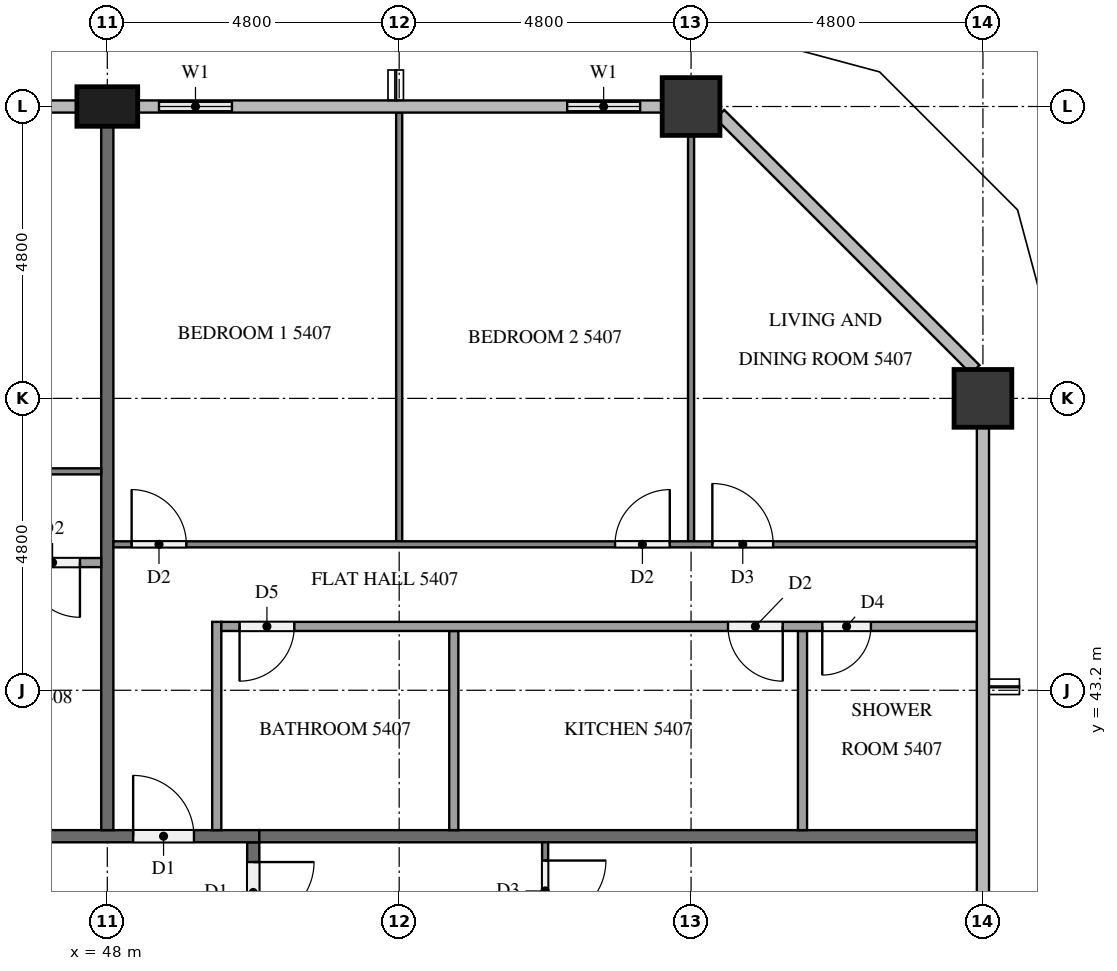
"""IFC4 building model, lengths in metres.
Left out: names, types, materials, properties, quantities, classifications, styles, units other than length and angle.
Written with IfcOpenShell. Run it as: python <this file> out.ifc"""

import sys

from ifc_helpers import new_model, si_unit, direction, frame, frame_2d, origin, origin_2d, place, context, subcontext, project, spatial, rectangle, extrude, element, fill, save


model = new_model("IFC4")
c1 = context("Model", 3, precision=1e-05, world=origin(), true_north=direction((0.0, 1.0)))
c2 = subcontext(c1, "Body", "Model", "MODEL_VIEW")
j1 = project(units=[si_unit("LENGTHUNIT", "METRE"), si_unit("PLANEANGLEUNIT", "RADIAN")], contexts=[c1])
p1 = place(None, origin())
s1 = spatial("IfcSite", under=j1, at=p1, CompositionType="ELEMENT")
p2 = place(p1, origin())
s2 = spatial("IfcBuilding", under=s1, at=p2, CompositionType="ELEMENT")
p3 = place(p2, frame((0.0, 0.0, 208.8)))
s3 = spatial("IfcBuildingStorey", under=s2, at=p3, CompositionType="ELEMENT", Elevation=208.8)
for number, where, z_axis, x_axis in (
    (1, (62.4, 48.0, 0.0), (0.0, 0.0, 1.0), (1.0, 0.0, 0.0)),
    (2, (57.6, 52.8, 0.0), (0.0, 0.0, 1.0), (1.0, 0.0, 0.0)),
):
    element("IfcColumn", number, at=place(p3, frame(where, z_axis=z_axis, x_axis=x_axis)), inside=s3, PredefinedType="COLUMN", context=c2, shape_type="SweptSolid", body=[
        extrude(rectangle(XDim=0.95, YDim=0.95, at=origin_2d()), origin(), (0.0, 0.0, 1.0), 3.2),
    ])
p4 = place(p3, frame((48.0, 52.8, 0.0), z_axis=(0.0, 0.0, 1.0), x_axis=(1.0, 0.0, 0.0)))
e3 = element("IfcColumn", 3, at=p4, inside=s3, PredefinedType="COLUMN", context=c2, shape_type="SweptSolid", body=[
    extrude(rectangle(XDim=1.0, YDim=0.65, at=origin_2d()), origin(), (0.0, 0.0, 1.0), 3.2),
])
p5 = place(p3, frame((57.125, 52.8, 0.0), z_axis=(0.0, 0.0, 1.0), x_axis=(-1.0, 0.0, 0.0)))
e4 = element("IfcWall", 4, at=p5, inside=s3, PredefinedType="SOLIDWALL", context=c2, shape_type="SweptSolid", body=[
    extrude(rectangle(XDim=1.925, YDim=0.15, at=frame_2d((0.962, 0.0))), origin(), (0.0, 0.0, 1.0), 3.2),
])
p6 = place(p5, frame((0.363, 0.0, 0.9)))
e5 = element("IfcOpeningElement", 5, at=p6, cuts=e4, PredefinedType="OPENING", context=c2, shape_type="SweptSolid", body=[
    extrude(rectangle(XDim=1.2, YDim=1.4, at=frame_2d((0.6, 0.7))), frame((0.0, 0.085, 0.0), z_axis=(0.0, -1.0, 0.0), x_axis=(1.0, 0.0, 0.0)), (0.0, 0.0, 1.0), 0.17),
])
p7 = place(p3, frame((50.4, 52.8, 0.0), z_axis=(0.0, 0.0, 1.0), x_axis=(-1.0, 0.0, 0.0)))
e6 = element("IfcWall", 6, at=p7, inside=s3, PredefinedType="SOLIDWALL", context=c2, shape_type="SweptSolid", body=[
    extrude(rectangle(XDim=1.9, YDim=0.15, at=frame_2d((0.95, 0.0))), origin(), (0.0, 0.0, 1.0), 3.2),
])
p8 = place(p7, frame((0.35, 0.0, 0.9)))
e7 = element("IfcOpeningElement", 7, at=p8, cuts=e6, PredefinedType="OPENING", context=c2, shape_type="SweptSolid", body=[
    extrude(rectangle(XDim=1.2, YDim=1.4, at=frame_2d((0.6, 0.7))), frame((0.0, 0.085, 0.0), z_axis=(0.0, -1.0, 0.0), x_axis=(1.0, 0.0, 0.0)), (0.0, 0.0, 1.0), 0.17),
])
p9 = place(p3, frame((50.4, 40.7, 0.0), z_axis=(0.0, 0.0, 1.0), x_axis=(0.0, -1.0, 0.0)))
e8 = element("IfcWall", 8, at=p9, inside=s3, PredefinedType="PARTITIONING", context=c2, shape_type="SweptSolid", body=[
    extrude(rectangle(XDim=28.6, YDim=0.2, at=frame_2d((14.3, 0.0))), origin(), (0.0, 0.0, 1.0), 3.2),
])
p10 = place(p9, frame((19.525, 0.0, 0.0)))
e9 = element("IfcOpeningElement", 9, at=p10, cuts=e8, PredefinedType="OPENING", context=c2, shape_type="SweptSolid", body=[
    extrude(rectangle(XDim=1.0, YDim=2.1, at=frame_2d((0.5, 1.05))), frame((0.0, 0.11, 0.0), z_axis=(0.0, -1.0, 0.0), x_axis=(1.0, 0.0, 0.0)), (0.0, 0.0, 1.0), 0.22),
])
p11 = place(p9, frame((7.525, 0.0, 0.0)))
e10 = element("IfcOpeningElement", 10, at=p11, cuts=e8, PredefinedType="OPENING", context=c2, shape_type="SweptSolid", body=[
    extrude(rectangle(XDim=1.0, YDim=2.1, at=frame_2d((0.5, 1.05))), frame((0.0, 0.11, 0.0), z_axis=(0.0, -1.0, 0.0), x_axis=(1.0, 0.0, 0.0)), (0.0, 0.0, 1.0), 0.22),
])
p12 = place(p9, frame((0.325, 0.0, 0.0)))
e11 = element("IfcOpeningElement", 11, at=p12, cuts=e8, PredefinedType="OPENING", context=c2, shape_type="SweptSolid", body=[
    extrude(rectangle(XDim=1.0, YDim=2.1, at=frame_2d((0.5, 1.05))), frame((0.0, 0.11, 0.0), z_axis=(0.0, -1.0, 0.0), x_axis=(1.0, 0.0, 0.0)), (0.0, 0.0, 1.0), 0.22),
])
p13 = place(p3, frame((11.9, 40.8, 0.0), z_axis=(0.0, 0.0, 1.0), x_axis=(1.0, 0.0, 0.0)))
e12 = element("IfcWall", 12, at=p13, inside=s3, PredefinedType="PARTITIONING", context=c2, shape_type="SweptSolid", body=[
    extrude(rectangle(XDim=38.6, YDim=0.2, at=frame_2d((19.3, 0.0))), origin(), (0.0, 0.0, 1.0), 3.2),
])
p14 = place(p13, frame((36.525, 0.0, 0.0)))
e13 = element("IfcOpeningElement", 13, at=p14, cuts=e12, PredefinedType="OPENING", context=c2, shape_type="SweptSolid", body=[
    extrude(rectangle(XDim=1.0, YDim=2.1, at=frame_2d((0.5, 1.05))), frame((0.0, 0.11, 0.0), z_axis=(0.0, -1.0, 0.0), x_axis=(1.0, 0.0, 0.0)), (0.0, 0.0, 1.0), 0.22),
])
p15 = place(p13, frame((29.325, 0.0, 0.0)))
e14 = element("IfcOpeningElement", 14, at=p15, cuts=e12, PredefinedType="OPENING", context=c2, shape_type="SweptSolid", body=[
    extrude(rectangle(XDim=1.0, YDim=2.1, at=frame_2d((0.5, 1.05))), frame((0.0, 0.11, 0.0), z_axis=(0.0, -1.0, 0.0), x_axis=(1.0, 0.0, 0.0)), (0.0, 0.0, 1.0), 0.22),
])
p16 = place(p13, frame((12.525, 0.0, 0.0)))
e15 = element("IfcOpeningElement", 15, at=p16, cuts=e12, PredefinedType="OPENING", context=c2, shape_type="SweptSolid", body=[
    extrude(rectangle(XDim=1.0, YDim=2.1, at=frame_2d((0.5, 1.05))), frame((0.0, 0.11, 0.0), z_axis=(0.0, -1.0, 0.0), x_axis=(1.0, 0.0, 0.0)), (0.0, 0.0, 1.0), 0.22),
])
p17 = place(p13, frame((10.625, 0.0, 0.0)))
e16 = element("IfcOpeningElement", 16, at=p17, cuts=e12, PredefinedType="OPENING", context=c2, shape_type="SweptSolid", body=[
    extrude(rectangle(XDim=1.1, YDim=2.1, at=frame_2d((0.55, 1.05))), frame((0.0, 0.11, 0.0), z_axis=(0.0, -1.0, 0.0), x_axis=(1.0, 0.0, 0.0)), (0.0, 0.0, 1.0), 0.22),
])
p18 = place(p3, frame((50.5, 40.8, 0.0), z_axis=(0.0, 0.0, 1.0), x_axis=(1.0, 0.0, 0.0)))
e17 = element("IfcWall", 17, at=p18, inside=s3, PredefinedType="PARTITIONING", context=c2, shape_type="SweptSolid", body=[
    extrude(rectangle(XDim=11.8, YDim=0.2, at=frame_2d((5.9, 0.0))), origin(), (0.0, 0.0, 1.0), 3.2),
])
p19 = place(p3, frame((48.0, 52.475, 0.0), z_axis=(0.0, 0.0, 1.0), x_axis=(0.0, -1.0, 0.0)))
e18 = element("IfcWall", 18, at=p19, inside=s3, PredefinedType="PARTITIONING", context=c2, shape_type="SweptSolid", body=[
    extrude(rectangle(XDim=11.575, YDim=0.2, at=frame_2d((5.788, 0.0))), origin(), (0.0, 0.0, 1.0), 3.2),
])
p20 = place(p3, frame((55.2, 40.7, 0.0), z_axis=(0.0, 0.0, 1.0), x_axis=(0.0, -1.0, 0.0)))
e19 = element("IfcWall", 19, at=p20, inside=s3, PredefinedType="PARTITIONING", context=c2, shape_type="SweptSolid", body=[
    extrude(rectangle(XDim=7.0, YDim=0.1, at=frame_2d((3.5, 0.0))), origin(), (0.0, 0.0, 1.0), 3.2),
])
p21 = place(p20, frame((0.3, 0.0, 0.0)))
e20 = element("IfcOpeningElement", 20, at=p21, cuts=e19, PredefinedType="OPENING", context=c2, shape_type="SweptSolid", body=[
    extrude(rectangle(XDim=1.0, YDim=2.1, at=frame_2d((0.5, 1.05))), frame((0.0, 0.06, 0.0), z_axis=(0.0, -1.0, 0.0), x_axis=(1.0, 0.0, 0.0)), (0.0, 0.0, 1.0), 0.12),
])
p22 = place(p3, frame((52.8, 45.65, 0.0), z_axis=(0.0, 0.0, 1.0), x_axis=(0.0, 1.0, 0.0)))
e21 = element("IfcWall", 21, at=p22, inside=s3, PredefinedType="PARTITIONING", context=c2, shape_type="SweptSolid", body=[
    extrude(rectangle(XDim=7.05, YDim=0.1, at=frame_2d((3.525, 0.0))), origin(), (0.0, 0.0, 1.0), 3.2),
])
p23 = place(p3, frame((57.6, 45.65, 0.0), z_axis=(0.0, 0.0, 1.0), x_axis=(0.0, 1.0, 0.0)))
e22 = element("IfcWall", 22, at=p23, inside=s3, PredefinedType="PARTITIONING", context=c2, shape_type="SweptSolid", body=[
    extrude(rectangle(XDim=6.675, YDim=0.1, at=frame_2d((3.337, 0.0))), origin(), (0.0, 0.0, 1.0), 3.2),
])
p24 = place(p3, frame((48.1, 45.6, 0.0), z_axis=(0.0, 0.0, 1.0), x_axis=(1.0, 0.0, 0.0)))
e23 = element("IfcWall", 23, at=p24, inside=s3, PredefinedType="PARTITIONING", context=c2, shape_type="SweptSolid", body=[
    extrude(rectangle(XDim=14.2, YDim=0.1, at=frame_2d((7.1, 0.0))), origin(), (0.0, 0.0, 1.0), 3.2),
])
p25 = place(p24, frame((0.3, 0.0, 0.0)))
e24 = element("IfcOpeningElement", 24, at=p25, cuts=e23, PredefinedType="OPENING", context=c2, shape_type="SweptSolid", body=[
    extrude(rectangle(XDim=0.9, YDim=2.1, at=frame_2d((0.45, 1.05))), frame((0.0, 0.06, 0.0), z_axis=(0.0, -1.0, 0.0), x_axis=(1.0, 0.0, 0.0)), (0.0, 0.0, 1.0), 0.12),
])
p26 = place(p24, frame((8.25, 0.0, 0.0)))
e25 = element("IfcOpeningElement", 25, at=p26, cuts=e23, PredefinedType="OPENING", context=c2, shape_type="SweptSolid", body=[
    extrude(rectangle(XDim=0.9, YDim=2.1, at=frame_2d((0.45, 1.05))), frame((0.0, 0.06, 0.0), z_axis=(0.0, -1.0, 0.0), x_axis=(1.0, 0.0, 0.0)), (0.0, 0.0, 1.0), 0.12),
])
p27 = place(p24, frame((9.85, 0.0, 0.0)))
e26 = element("IfcOpeningElement", 26, at=p27, cuts=e23, PredefinedType="OPENING", context=c2, shape_type="SweptSolid", body=[
    extrude(rectangle(XDim=1.0, YDim=2.1, at=frame_2d((0.5, 1.05))), frame((0.0, 0.06, 0.0), z_axis=(0.0, -1.0, 0.0), x_axis=(1.0, 0.0, 0.0)), (0.0, 0.0, 1.0), 0.12),
])
for number, where, z_axis, x_axis in (
    (27, (53.698, 40.9, 0.0), (0.0, 0.0, 1.0), (0.0, 1.0, 0.0)),
    (28, (59.433, 40.9, 0.0), (0.0, 0.0, 1.0), (0.0, 1.0, 0.0)),
):
    element("IfcWall", number, at=place(p3, frame(where, z_axis=z_axis, x_axis=x_axis)), inside=s3, PredefinedType="PARTITIONING", context=c2, shape_type="SweptSolid", body=[
        extrude(rectangle(XDim=3.275, YDim=0.15, at=frame_2d((1.638, 0.0))), origin(), (0.0, 0.0, 1.0), 3.2),
    ])
p28 = place(p3, frame((49.8, 40.9, 0.0), z_axis=(0.0, 0.0, 1.0), x_axis=(0.0, 1.0, 0.0)))
e29 = element("IfcWall", 29, at=p28, inside=s3, PredefinedType="PARTITIONING", context=c2, shape_type="SweptSolid", body=[
    extrude(rectangle(XDim=3.425, YDim=0.15, at=frame_2d((1.712, 0.0))), origin(), (0.0, 0.0, 1.0), 3.2),
])
p29 = place(p3, frame((62.3, 44.25, 0.0), z_axis=(0.0, 0.0, 1.0), x_axis=(-1.0, 0.0, 0.0)))
e30 = element("IfcWall", 30, at=p29, inside=s3, PredefinedType="PARTITIONING", context=c2, shape_type="SweptSolid", body=[
    extrude(rectangle(XDim=12.425, YDim=0.15, at=frame_2d((6.212, 0.0))), origin(), (0.0, 0.0, 1.0), 3.2),
])
p30 = place(p29, frame((11.225, 0.0, 0.0)))
e31 = element("IfcOpeningElement", 31, at=p30, cuts=e30, PredefinedType="OPENING", context=c2, shape_type="SweptSolid", body=[
    extrude(rectangle(XDim=0.9, YDim=2.1, at=frame_2d((0.45, 1.05))), frame((0.0, 0.085, 0.0), z_axis=(0.0, -1.0, 0.0), x_axis=(1.0, 0.0, 0.0)), (0.0, 0.0, 1.0), 0.17),
])
p31 = place(p29, frame((3.192, 0.0, 0.0)))
e32 = element("IfcOpeningElement", 32, at=p31, cuts=e30, PredefinedType="OPENING", context=c2, shape_type="SweptSolid", body=[
    extrude(rectangle(XDim=0.9, YDim=2.1, at=frame_2d((0.45, 1.05))), frame((0.0, 0.085, 0.0), z_axis=(0.0, -1.0, 0.0), x_axis=(1.0, 0.0, 0.0)), (0.0, 0.0, 1.0), 0.17),
])
p32 = place(p29, frame((1.742, 0.0, 0.0)))
e33 = element("IfcOpeningElement", 33, at=p32, cuts=e30, PredefinedType="OPENING", context=c2, shape_type="SweptSolid", body=[
    extrude(rectangle(XDim=0.8, YDim=2.1, at=frame_2d((0.4, 1.05))), frame((0.0, 0.085, 0.0), z_axis=(0.0, -1.0, 0.0), x_axis=(1.0, 0.0, 0.0)), (0.0, 0.0, 1.0), 0.17),
])
p33 = place(p3, frame((40.9, 46.8, 0.0), z_axis=(0.0, 0.0, 1.0), x_axis=(1.0, 0.0, 0.0)))
e34 = element("IfcWall", 34, at=p33, inside=s3, PredefinedType="PARTITIONING", context=c2, shape_type="SweptSolid", body=[
    extrude(rectangle(XDim=7.0, YDim=0.1, at=frame_2d((3.5, 0.0))), origin(), (0.0, 0.0, 1.0), 3.2),
])
p34 = place(p33, frame((0.3, 0.0, 0.0)))
e35 = element("IfcOpeningElement", 35, at=p34, cuts=e34, PredefinedType="OPENING", context=c2, shape_type="SweptSolid", body=[
    extrude(rectangle(XDim=1.0, YDim=2.1, at=frame_2d((0.5, 1.05))), frame((0.0, 0.06, 0.0), z_axis=(0.0, -1.0, 0.0), x_axis=(1.0, 0.0, 0.0)), (0.0, 0.0, 1.0), 0.12),
])
p35 = place(p3, frame((47.9, 45.3, 0.0), z_axis=(0.0, 0.0, 1.0), x_axis=(-1.0, 0.0, 0.0)))
e36 = element("IfcWall", 36, at=p35, inside=s3, PredefinedType="PARTITIONING", context=c2, shape_type="SweptSolid", body=[
    extrude(rectangle(XDim=5.225, YDim=0.15, at=frame_2d((2.612, 0.0))), origin(), (0.0, 0.0, 1.0), 3.2),
])
p36 = place(p35, frame((4.125, 0.0, 0.0)))
e37 = element("IfcOpeningElement", 37, at=p36, cuts=e36, PredefinedType="OPENING", context=c2, shape_type="SweptSolid", body=[
    extrude(rectangle(XDim=0.8, YDim=2.1, at=frame_2d((0.4, 1.05))), frame((0.0, 0.085, 0.0), z_axis=(0.0, -1.0, 0.0), x_axis=(1.0, 0.0, 0.0)), (0.0, 0.0, 1.0), 0.17),
])
p37 = place(p35, frame((0.35, 0.0, 0.0)))
e38 = element("IfcOpeningElement", 38, at=p37, cuts=e36, PredefinedType="OPENING", context=c2, shape_type="SweptSolid", body=[
    extrude(rectangle(XDim=0.9, YDim=2.1, at=frame_2d((0.45, 1.05))), frame((0.0, 0.085, 0.0), z_axis=(0.0, -1.0, 0.0), x_axis=(1.0, 0.0, 0.0)), (0.0, 0.0, 1.0), 0.17),
])
p38 = place(p6, origin())
e39 = element("IfcWindow", 39, at=p38, inside=s3, PartitioningType="SINGLE_PANEL", PredefinedType="WINDOW", context=c2, shape_type="SweptSolid", body=[
    extrude(rectangle(XDim=1.2, YDim=1.4, at=frame_2d((0.6, 0.7))), frame((0.0, 0.03, 0.0), z_axis=(0.0, -1.0, 0.0), x_axis=(1.0, 0.0, 0.0)), (0.0, 0.0, 1.0), 0.06),
])
fill(e5, e39)
p39 = place(p8, origin())
e40 = element("IfcWindow", 40, at=p39, inside=s3, PartitioningType="SINGLE_PANEL", PredefinedType="WINDOW", context=c2, shape_type="SweptSolid", body=[
    extrude(rectangle(XDim=1.2, YDim=1.4, at=frame_2d((0.6, 0.7))), frame((0.0, 0.03, 0.0), z_axis=(0.0, -1.0, 0.0), x_axis=(1.0, 0.0, 0.0)), (0.0, 0.0, 1.0), 0.06),
])
fill(e7, e40)
p40 = place(p12, origin())
e41 = element("IfcDoor", 41, at=p40, inside=s3, OperationType="SINGLE_SWING_LEFT", PredefinedType="DOOR", context=c2, shape_type="SweptSolid", body=[
    extrude(rectangle(XDim=1.0, YDim=2.1, at=frame_2d((0.5, 1.05))), frame((0.0, 0.025, 0.0), z_axis=(0.0, -1.0, 0.0), x_axis=(1.0, 0.0, 0.0)), (0.0, 0.0, 1.0), 0.05),
])
fill(e11, e41)
p41 = place(p14, origin())
e42 = element("IfcDoor", 42, at=p41, inside=s3, OperationType="SINGLE_SWING_LEFT", PredefinedType="DOOR", context=c2, shape_type="SweptSolid", body=[
    extrude(rectangle(XDim=1.0, YDim=2.1, at=frame_2d((0.5, 1.05))), frame((0.0, 0.025, 0.0), z_axis=(0.0, -1.0, 0.0), x_axis=(1.0, 0.0, 0.0)), (0.0, 0.0, 1.0), 0.05),
])
fill(e13, e42)
p42 = place(p21, origin())
e43 = element("IfcDoor", 43, at=p42, inside=s3, OperationType="SINGLE_SWING_LEFT", PredefinedType="DOOR", context=c2, shape_type="SweptSolid", body=[
    extrude(rectangle(XDim=1.0, YDim=2.1, at=frame_2d((0.5, 1.05))), frame((0.0, 0.025, 0.0), z_axis=(0.0, -1.0, 0.0), x_axis=(1.0, 0.0, 0.0)), (0.0, 0.0, 1.0), 0.05),
])
fill(e20, e43)
p43 = place(p25, origin())
e44 = element("IfcDoor", 44, at=p43, inside=s3, OperationType="SINGLE_SWING_LEFT", PredefinedType="DOOR", context=c2, shape_type="SweptSolid", body=[
    extrude(rectangle(XDim=0.9, YDim=2.1, at=frame_2d((0.45, 1.05))), frame((0.0, 0.025, 0.0), z_axis=(0.0, -1.0, 0.0), x_axis=(1.0, 0.0, 0.0)), (0.0, 0.0, 1.0), 0.05),
])
fill(e24, e44)
p44 = place(p26, origin())
e45 = element("IfcDoor", 45, at=p44, inside=s3, OperationType="SINGLE_SWING_RIGHT", PredefinedType="DOOR", context=c2, shape_type="SweptSolid", body=[
    extrude(rectangle(XDim=0.9, YDim=2.1, at=frame_2d((0.45, 1.05))), frame((0.0, 0.025, 0.0), z_axis=(0.0, -1.0, 0.0), x_axis=(1.0, 0.0, 0.0)), (0.0, 0.0, 1.0), 0.05),
])
fill(e25, e45)
p45 = place(p27, origin())
e46 = element("IfcDoor", 46, at=p45, inside=s3, OperationType="SINGLE_SWING_LEFT", PredefinedType="DOOR", context=c2, shape_type="SweptSolid", body=[
    extrude(rectangle(XDim=1.0, YDim=2.1, at=frame_2d((0.5, 1.05))), frame((0.0, 0.025, 0.0), z_axis=(0.0, -1.0, 0.0), x_axis=(1.0, 0.0, 0.0)), (0.0, 0.0, 1.0), 0.05),
])
fill(e26, e46)
p46 = place(p30, origin())
e47 = element("IfcDoor", 47, at=p46, inside=s3, OperationType="SINGLE_SWING_RIGHT", PredefinedType="DOOR", context=c2, shape_type="SweptSolid", body=[
    extrude(rectangle(XDim=0.9, YDim=2.1, at=frame_2d((0.45, 1.05))), frame((0.0, 0.025, 0.0), z_axis=(0.0, -1.0, 0.0), x_axis=(1.0, 0.0, 0.0)), (0.0, 0.0, 1.0), 0.05),
])
fill(e31, e47)
p47 = place(p31, origin())
e48 = element("IfcDoor", 48, at=p47, inside=s3, OperationType="SINGLE_SWING_LEFT", PredefinedType="DOOR", context=c2, shape_type="SweptSolid", body=[
    extrude(rectangle(XDim=0.9, YDim=2.1, at=frame_2d((0.45, 1.05))), frame((0.0, 0.025, 0.0), z_axis=(0.0, -1.0, 0.0), x_axis=(1.0, 0.0, 0.0)), (0.0, 0.0, 1.0), 0.05),
])
fill(e32, e48)
p48 = place(p32, origin())
e49 = element("IfcDoor", 49, at=p48, inside=s3, OperationType="SINGLE_SWING_RIGHT", PredefinedType="DOOR", context=c2, shape_type="SweptSolid", body=[
    extrude(rectangle(XDim=0.8, YDim=2.1, at=frame_2d((0.4, 1.05))), frame((0.0, 0.025, 0.0), z_axis=(0.0, -1.0, 0.0), x_axis=(1.0, 0.0, 0.0)), (0.0, 0.0, 1.0), 0.05),
])
fill(e33, e49)
p49 = place(p37, origin())
e50 = element("IfcDoor", 50, at=p49, inside=s3, OperationType="SINGLE_SWING_LEFT", PredefinedType="DOOR", context=c2, shape_type="SweptSolid", body=[
    extrude(rectangle(XDim=0.9, YDim=2.1, at=frame_2d((0.45, 1.05))), frame((0.0, 0.025, 0.0), z_axis=(0.0, -1.0, 0.0), x_axis=(1.0, 0.0, 0.0)), (0.0, 0.0, 1.0), 0.05),
])
fill(e38, e50)
save(model, sys.argv[1])
